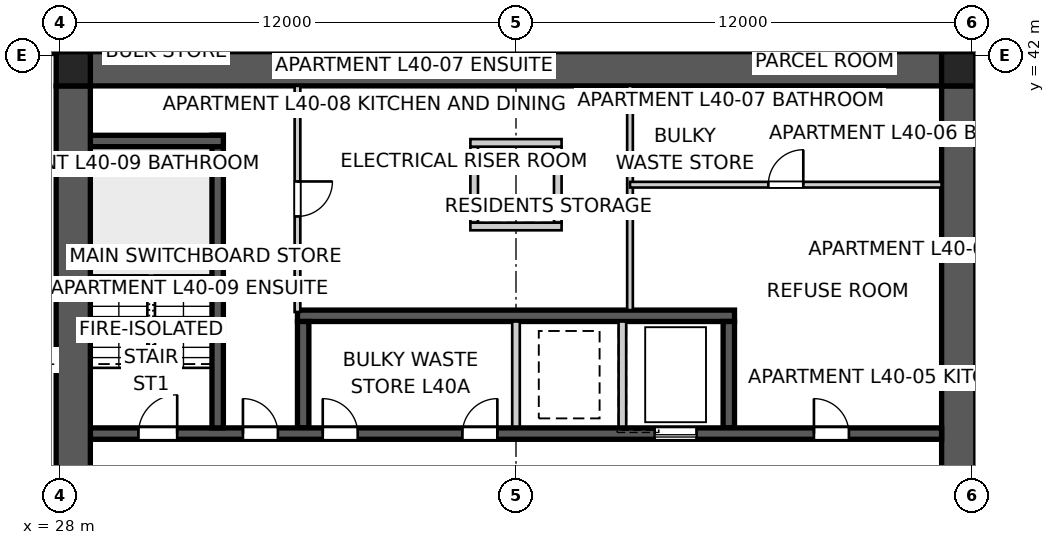
"""IFC4 building model, lengths in metres.
Left out: names, types, materials, properties, quantities, classifications, styles, units other than length and angle.
Written with IfcOpenShell. Run it as: python <this file> out.ifc"""

import sys

from ifc_helpers import new_model, si_unit, direction, frame, frame_2d, origin, origin_2d, place, context, subcontext, project, spatial, polyline, rectangle, outline, extrude, element, fill, save


model = new_model("IFC4")
c1 = context("Model", 3, precision=1e-05, world=origin(), true_north=direction((0.0, 1.0)))
c2 = subcontext(c1, "Body", "Model", "MODEL_VIEW")
j1 = project(units=[si_unit("LENGTHUNIT", "METRE"), si_unit("PLANEANGLEUNIT", "RADIAN")], contexts=[c1])
p1 = place(None, origin())
s1 = spatial("IfcSite", under=j1, at=p1, CompositionType="ELEMENT")
p2 = place(p1, origin())
s2 = spatial("IfcBuilding", under=s1, at=p2, CompositionType="ELEMENT")
p3 = place(p2, frame((0.0, 0.0, 147.2)))
s3 = spatial("IfcBuildingStorey", under=s2, at=p3, CompositionType="ELEMENT", Elevation=147.2)
p4 = place(p3, frame((28.8, 41.65, 0.0), z_axis=(0.0, 0.0, 1.0), x_axis=(1.0, 0.0, 0.0)))
e1 = element("IfcWall", 1, at=p4, inside=s3, PredefinedType="SHEAR", context=c2, shape_type="SweptSolid", body=[
    extrude(outline(polyline([(0.0, -0.45), (22.4, -0.45), (22.4, -0.025), (22.85, -0.025), (22.85, 0.025), (22.4, 0.025), (22.4, 0.45), (0.0, 0.45), (0.0, 0.025), (-0.45, 0.025), (-0.45, -0.025), (0.0, -0.025), (0.0, -0.45)])), origin(), (0.0, 0.0, 1.0), 3.4),
])
p5 = place(p3, frame((51.65, 18.8, 0.0), z_axis=(0.0, 0.0, 1.0), x_axis=(0.0, 1.0, 0.0)))
e2 = element("IfcWall", 2, at=p5, inside=s3, PredefinedType="SHEAR", context=c2, shape_type="SweptSolid", body=[
    extrude(outline(polyline([(0.0, -0.45), (22.4, -0.45), (22.4, -0.025), (22.85, -0.025), (22.85, 0.025), (22.4, 0.025), (22.4, 0.45), (0.0, 0.45), (0.0, 0.025), (-0.45, 0.025), (-0.45, -0.025), (0.0, -0.025), (0.0, -0.45)])), origin(), (0.0, 0.0, 1.0), 3.4),
])
p6 = place(p5, frame((11.14, 0.0, 0.0)))
e3 = element("IfcOpeningElement", 3, at=p6, cuts=e2, PredefinedType="OPENING", context=c2, shape_type="SweptSolid", body=[
    extrude(rectangle(XDim=1.02, YDim=2.4, at=frame_2d((0.51, 1.2))), frame((0.0, 0.46, 0.0), z_axis=(0.0, -1.0, 0.0), x_axis=(1.0, 0.0, 0.0)), (0.0, 0.0, 1.0), 0.92),
])
p7 = place(p3, frame((28.35, 41.2, 0.0), z_axis=(0.0, 0.0, 1.0), x_axis=(0.0, -1.0, 0.0)))
e4 = element("IfcWall", 4, at=p7, inside=s3, PredefinedType="SHEAR", context=c2, shape_type="SweptSolid", body=[
    extrude(outline(polyline([(0.0, -0.45), (22.4, -0.45), (22.4, -0.025), (22.85, -0.025), (22.85, 0.025), (22.4, 0.025), (22.4, 0.45), (0.0, 0.45), (0.0, 0.025), (-0.45, 0.025), (-0.45, -0.025), (0.0, -0.025), (0.0, -0.45)])), origin(), (0.0, 0.0, 1.0), 3.4),
])
p8 = place(p7, frame((11.14, 0.0, 0.0)))
e5 = element("IfcOpeningElement", 5, at=p8, cuts=e4, PredefinedType="OPENING", context=c2, shape_type="SweptSolid", body=[
    extrude(rectangle(XDim=1.02, YDim=2.4, at=frame_2d((0.51, 1.2))), frame((0.0, 0.46, 0.0), z_axis=(0.0, -1.0, 0.0), x_axis=(1.0, 0.0, 0.0)), (0.0, 0.0, 1.0), 0.92),
])
p9 = place(p3, frame((28.8, 32.05, 0.0), z_axis=(0.0, 0.0, 1.0), x_axis=(1.0, 0.0, 0.0)))
e6 = element("IfcWall", 6, at=p9, inside=s3, PredefinedType="SHEAR", context=c2, shape_type="SweptSolid", body=[
    extrude(rectangle(XDim=22.4, YDim=0.3, at=frame_2d((11.2, 0.0))), origin(), (0.0, 0.0, 1.0), 3.4),
])
p10 = place(p9, frame((19.04, 0.0, 0.0)))
e7 = element("IfcOpeningElement", 7, at=p10, cuts=e6, PredefinedType="OPENING", context=c2, shape_type="SweptSolid", body=[
    extrude(rectangle(XDim=0.92, YDim=2.1, at=frame_2d((0.46, 1.05))), frame((0.0, 0.16, 0.0), z_axis=(0.0, -1.0, 0.0), x_axis=(1.0, 0.0, 0.0)), (0.0, 0.0, 1.0), 0.32),
])
p11 = place(p9, frame((1.265, 0.0, 0.0)))
e8 = element("IfcOpeningElement", 8, at=p11, cuts=e6, PredefinedType="OPENING", context=c2, shape_type="SweptSolid", body=[
    extrude(rectangle(XDim=1.02, YDim=2.1, at=frame_2d((0.51, 1.05))), frame((0.0, 0.16, 0.0), z_axis=(0.0, -1.0, 0.0), x_axis=(1.0, 0.0, 0.0)), (0.0, 0.0, 1.0), 0.32),
])
p12 = place(p9, frame((4.015, 0.0, 0.0)))
e9 = element("IfcOpeningElement", 9, at=p12, cuts=e6, PredefinedType="OPENING", context=c2, shape_type="SweptSolid", body=[
    extrude(rectangle(XDim=0.92, YDim=2.1, at=frame_2d((0.46, 1.05))), frame((0.0, 0.16, 0.0), z_axis=(0.0, -1.0, 0.0), x_axis=(1.0, 0.0, 0.0)), (0.0, 0.0, 1.0), 0.32),
])
p13 = place(p9, frame((6.115, 0.0, 0.0)))
e10 = element("IfcOpeningElement", 10, at=p13, cuts=e6, PredefinedType="OPENING", context=c2, shape_type="SweptSolid", body=[
    extrude(rectangle(XDim=0.92, YDim=2.1, at=frame_2d((0.46, 1.05))), frame((0.0, 0.16, 0.0), z_axis=(0.0, -1.0, 0.0), x_axis=(1.0, 0.0, 0.0)), (0.0, 0.0, 1.0), 0.32),
])
p14 = place(p9, frame((9.79, 0.0, 0.0)))
e11 = element("IfcOpeningElement", 11, at=p14, cuts=e6, PredefinedType="OPENING", context=c2, shape_type="SweptSolid", body=[
    extrude(rectangle(XDim=0.92, YDim=2.1, at=frame_2d((0.46, 1.05))), frame((0.0, 0.16, 0.0), z_axis=(0.0, -1.0, 0.0), x_axis=(1.0, 0.0, 0.0)), (0.0, 0.0, 1.0), 0.32),
])
p15 = place(p9, frame((14.85, 0.0, 0.0)))
e12 = element("IfcOpeningElement", 12, at=p15, cuts=e6, PredefinedType="OPENING", context=c2, shape_type="SweptSolid", body=[
    extrude(rectangle(XDim=1.1, YDim=2.1, at=frame_2d((0.55, 1.05))), frame((0.0, 0.16, 0.0), z_axis=(0.0, -1.0, 0.0), x_axis=(1.0, 0.0, 0.0)), (0.0, 0.0, 1.0), 0.32),
])
p16 = place(p3, frame((34.25, 35.15, 0.0), z_axis=(0.0, 0.0, 1.0), x_axis=(1.0, 0.0, 0.0)))
e13 = element("IfcWall", 13, at=p16, inside=s3, PredefinedType="SHEAR", context=c2, shape_type="SweptSolid", body=[
    extrude(rectangle(XDim=11.5, YDim=0.3, at=frame_2d((5.75, 0.0))), origin(), (0.0, 0.0, 1.0), 3.4),
])
p17 = place(p3, frame((34.4, 32.2, 0.0), z_axis=(0.0, 0.0, 1.0), x_axis=(0.0, 1.0, 0.0)))
e14 = element("IfcWall", 14, at=p17, inside=s3, PredefinedType="SHEAR", context=c2, shape_type="SweptSolid", body=[
    extrude(rectangle(XDim=2.8, YDim=0.3, at=frame_2d((1.4, 0.0))), origin(), (0.0, 0.0, 1.0), 3.4),
])
for number, where, z_axis, x_axis in (
    (15, (40.0, 32.2, 0.0), (0.0, 0.0, 1.0), (0.0, 1.0, 0.0)),
    (16, (42.8, 32.2, 0.0), (0.0, 0.0, 1.0), (0.0, 1.0, 0.0)),
):
    element("IfcWall", number, at=place(p3, frame(where, z_axis=z_axis, x_axis=x_axis)), inside=s3, PredefinedType="SOLIDWALL", context=c2, shape_type="SweptSolid", body=[
        extrude(rectangle(XDim=2.8, YDim=0.2, at=frame_2d((1.4, 0.0))), origin(), (0.0, 0.0, 1.0), 3.4),
    ])
p18 = place(p3, frame((45.6, 32.2, 0.0), z_axis=(0.0, 0.0, 1.0), x_axis=(0.0, 1.0, 0.0)))
e17 = element("IfcWall", 17, at=p18, inside=s3, PredefinedType="SHEAR", context=c2, shape_type="SweptSolid", body=[
    extrude(rectangle(XDim=2.8, YDim=0.3, at=frame_2d((1.4, 0.0))), origin(), (0.0, 0.0, 1.0), 3.4),
])
p19 = place(p3, frame((32.15, 32.2, 0.0), z_axis=(0.0, 0.0, 1.0), x_axis=(0.0, 1.0, 0.0)))
e18 = element("IfcWall", 18, at=p19, inside=s3, PredefinedType="SHEAR", context=c2, shape_type="SweptSolid", body=[
    extrude(rectangle(XDim=7.7, YDim=0.3, at=frame_2d((3.85, 0.0))), origin(), (0.0, 0.0, 1.0), 3.4),
])
p20 = place(p3, frame((28.8, 39.75, 0.0), z_axis=(0.0, 0.0, 1.0), x_axis=(1.0, 0.0, 0.0)))
e19 = element("IfcWall", 19, at=p20, inside=s3, PredefinedType="SHEAR", context=c2, shape_type="SweptSolid", body=[
    extrude(rectangle(XDim=3.5, YDim=0.3, at=frame_2d((1.75, 0.0))), origin(), (0.0, 0.0, 1.0), 3.4),
])
for number, where, z_axis, x_axis in (
    (20, (38.9, 37.6, 0.0), (0.0, 0.0, 1.0), (0.0, 1.0, 0.0)),
    (21, (41.1, 37.6, 0.0), (0.0, 0.0, 1.0), (0.0, 1.0, 0.0)),
):
    element("IfcWall", number, at=place(p3, frame(where, z_axis=z_axis, x_axis=x_axis)), inside=s3, PredefinedType="SOLIDWALL", context=c2, shape_type="SweptSolid", body=[
        extrude(rectangle(XDim=2.0, YDim=0.2, at=frame_2d((1.0, 0.0))), origin(), (0.0, 0.0, 1.0), 3.4),
    ])
for number, where, z_axis, x_axis in (
    (22, (38.8, 37.5, 0.0), (0.0, 0.0, 1.0), (1.0, 0.0, 0.0)),
    (23, (38.8, 39.7, 0.0), (0.0, 0.0, 1.0), (1.0, 0.0, 0.0)),
):
    element("IfcWall", number, at=place(p3, frame(where, z_axis=z_axis, x_axis=x_axis)), inside=s3, PredefinedType="SOLIDWALL", context=c2, shape_type="SweptSolid", body=[
        extrude(rectangle(XDim=2.4, YDim=0.2, at=frame_2d((1.2, 0.0))), origin(), (0.0, 0.0, 1.0), 3.4),
    ])
for number, where, z_axis, x_axis in (
    (24, (51.65, 41.65, 0.0), (0.0, 0.0, 1.0), (1.0, 0.0, 0.0)),
    (25, (28.35, 41.65, 0.0), (0.0, 0.0, 1.0), (1.0, 0.0, 0.0)),
):
    element("IfcColumn", number, at=place(p3, frame(where, z_axis=z_axis, x_axis=x_axis)), inside=s3, PredefinedType="COLUMN", context=c2, shape_type="SweptSolid", body=[
        extrude(rectangle(XDim=0.9, YDim=0.9, at=origin_2d()), origin(), (0.0, 0.0, 1.0), 3.4),
    ])
p21 = place(p3, frame((34.25, 41.2, 0.0), z_axis=(0.0, 0.0, 1.0), x_axis=(0.0, -1.0, 0.0)))
e26 = element("IfcWall", 26, at=p21, inside=s3, PredefinedType="SOLIDWALL", context=c2, shape_type="SweptSolid", body=[
    extrude(rectangle(XDim=5.95, YDim=0.15, at=frame_2d((2.975, 0.0))), origin(), (0.0, 0.0, 1.0), 3.25),
])
p22 = place(p21, frame((2.515, 0.0, 0.0)))
e27 = element("IfcOpeningElement", 27, at=p22, cuts=e26, PredefinedType="OPENING", context=c2, shape_type="SweptSolid", body=[
    extrude(rectangle(XDim=0.92, YDim=2.1, at=frame_2d((0.46, 1.05))), frame((0.0, 0.085, 0.0), z_axis=(0.0, -1.0, 0.0), x_axis=(1.0, 0.0, 0.0)), (0.0, 0.0, 1.0), 0.17),
])
p23 = place(p3, frame((43.0, 41.2, 0.0), z_axis=(0.0, 0.0, 1.0), x_axis=(0.0, -1.0, 0.0)))
e28 = element("IfcWall", 28, at=p23, inside=s3, PredefinedType="SOLIDWALL", context=c2, shape_type="SweptSolid", body=[
    extrude(rectangle(XDim=5.9, YDim=0.15, at=frame_2d((2.95, 0.0))), origin(), (0.0, 0.0, 1.0), 3.25),
])
p24 = place(p3, frame((43.0, 38.6, 0.0), z_axis=(0.0, 0.0, 1.0), x_axis=(1.0, 0.0, 0.0)))
e29 = element("IfcWall", 29, at=p24, inside=s3, PredefinedType="SOLIDWALL", context=c2, shape_type="SweptSolid", body=[
    extrude(rectangle(XDim=8.2, YDim=0.15, at=frame_2d((4.1, 0.0))), origin(), (0.0, 0.0, 1.0), 3.25),
])
p25 = place(p24, frame((3.64, 0.0, 0.0)))
e30 = element("IfcOpeningElement", 30, at=p25, cuts=e29, PredefinedType="OPENING", context=c2, shape_type="SweptSolid", body=[
    extrude(rectangle(XDim=0.92, YDim=2.1, at=frame_2d((0.46, 1.05))), frame((0.0, 0.085, 0.0), z_axis=(0.0, -1.0, 0.0), x_axis=(1.0, 0.0, 0.0)), (0.0, 0.0, 1.0), 0.17),
])
p26 = place(p3, frame((27.9, 44.35, 0.0), z_axis=(0.0, 0.0, 1.0), x_axis=(0.0, -1.0, 0.0)))
e31 = element("IfcWall", 31, at=p26, inside=s3, PredefinedType="PARTITIONING", context=c2, shape_type="SweptSolid", body=[
    extrude(rectangle(XDim=2.3, YDim=0.2, at=frame_2d((1.15, 0.0))), origin(), (0.0, 0.0, 1.0), 3.25),
])
p27 = place(p3, frame((52.1, 41.18, 0.0), z_axis=(0.0, 0.0, 1.0), x_axis=(0.0, 1.0, 0.0)))
e32 = element("IfcWall", 32, at=p27, inside=s3, PredefinedType="PARTITIONING", context=c2, shape_type="SweptSolid", body=[
    extrude(rectangle(XDim=3.17, YDim=0.2, at=frame_2d((1.585, 0.0))), origin(), (0.0, 0.0, 1.0), 3.25),
])
p28 = place(p10, origin())
e33 = element("IfcDoor", 33, at=p28, inside=s3, OperationType="SINGLE_SWING_LEFT", PredefinedType="DOOR", context=c2, shape_type="SweptSolid", body=[
    extrude(rectangle(XDim=0.92, YDim=2.1, at=frame_2d((0.46, 1.05))), frame((0.0, 0.025, 0.0), z_axis=(0.0, -1.0, 0.0), x_axis=(1.0, 0.0, 0.0)), (0.0, 0.0, 1.0), 0.05),
])
fill(e7, e33)
p29 = place(p11, origin())
e34 = element("IfcDoor", 34, at=p29, inside=s3, OperationType="SINGLE_SWING_RIGHT", PredefinedType="DOOR", context=c2, shape_type="SweptSolid", body=[
    extrude(rectangle(XDim=1.02, YDim=2.1, at=frame_2d((0.51, 1.05))), frame((0.0, 0.025, 0.0), z_axis=(0.0, -1.0, 0.0), x_axis=(1.0, 0.0, 0.0)), (0.0, 0.0, 1.0), 0.05),
])
fill(e8, e34)
p30 = place(p12, origin())
e35 = element("IfcDoor", 35, at=p30, inside=s3, OperationType="SINGLE_SWING_LEFT", PredefinedType="DOOR", context=c2, shape_type="SweptSolid", body=[
    extrude(rectangle(XDim=0.92, YDim=2.1, at=frame_2d((0.46, 1.05))), frame((0.0, 0.025, 0.0), z_axis=(0.0, -1.0, 0.0), x_axis=(1.0, 0.0, 0.0)), (0.0, 0.0, 1.0), 0.05),
])
fill(e9, e35)
p31 = place(p25, origin())
e36 = element("IfcDoor", 36, at=p31, inside=s3, OperationType="SINGLE_SWING_RIGHT", PredefinedType="DOOR", context=c2, shape_type="SweptSolid", body=[
    extrude(rectangle(XDim=0.92, YDim=2.1, at=frame_2d((0.46, 1.05))), frame((0.0, 0.025, 0.0), z_axis=(0.0, -1.0, 0.0), x_axis=(1.0, 0.0, 0.0)), (0.0, 0.0, 1.0), 0.05),
])
fill(e30, e36)
p32 = place(p22, origin())
e37 = element("IfcDoor", 37, at=p32, inside=s3, OperationType="SINGLE_SWING_LEFT", PredefinedType="DOOR", context=c2, shape_type="SweptSolid", body=[
    extrude(rectangle(XDim=0.92, YDim=2.1, at=frame_2d((0.46, 1.05))), frame((0.0, 0.025, 0.0), z_axis=(0.0, -1.0, 0.0), x_axis=(1.0, 0.0, 0.0)), (0.0, 0.0, 1.0), 0.05),
])
fill(e27, e37)
p33 = place(p13, origin())
e38 = element("IfcDoor", 38, at=p33, inside=s3, OperationType="SINGLE_SWING_LEFT", PredefinedType="DOOR", context=c2, shape_type="SweptSolid", body=[
    extrude(rectangle(XDim=0.92, YDim=2.1, at=frame_2d((0.46, 1.05))), frame((0.0, 0.025, 0.0), z_axis=(0.0, -1.0, 0.0), x_axis=(1.0, 0.0, 0.0)), (0.0, 0.0, 1.0), 0.05),
])
fill(e10, e38)
p34 = place(p14, origin())
e39 = element("IfcDoor", 39, at=p34, inside=s3, OperationType="SINGLE_SWING_RIGHT", PredefinedType="DOOR", context=c2, shape_type="SweptSolid", body=[
    extrude(rectangle(XDim=0.92, YDim=2.1, at=frame_2d((0.46, 1.05))), frame((0.0, 0.025, 0.0), z_axis=(0.0, -1.0, 0.0), x_axis=(1.0, 0.0, 0.0)), (0.0, 0.0, 1.0), 0.05),
])
fill(e11, e39)
p35 = place(p15, origin())
e40 = element("IfcDoor", 40, at=p35, inside=s3, OperationType="SLIDING_TO_LEFT", PredefinedType="DOOR", context=c2, shape_type="SweptSolid", body=[
    extrude(rectangle(XDim=1.1, YDim=2.1, at=frame_2d((0.55, 1.05))), frame((0.0, 0.025, 0.0), z_axis=(0.0, -1.0, 0.0), x_axis=(1.0, 0.0, 0.0)), (0.0, 0.0, 1.0), 0.05),
])
fill(e12, e40)
save(model, sys.argv[1])
